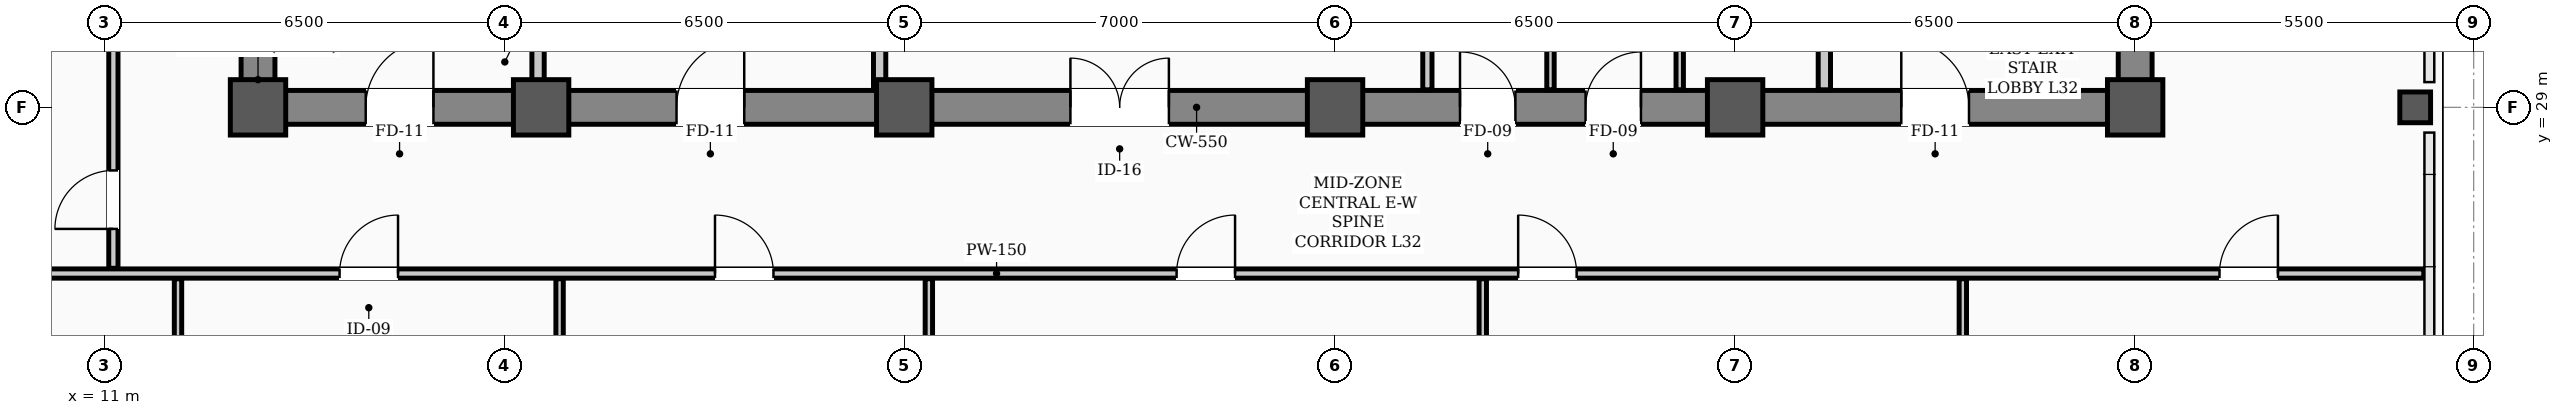
"""IFC4 building model, lengths in metres.
Left out: names, types, materials, properties, quantities, classifications, styles, units other than length and angle.
Written with IfcOpenShell. Run it as: python <this file> out.ifc"""

import sys

from ifc_helpers import new_model, si_unit, direction, frame, frame_2d, origin, origin_2d, place, context, subcontext, project, spatial, rectangle, hollow_rectangle, extrude, element, fill, save


model = new_model("IFC4")
c1 = context("Model", 3, precision=1e-05, world=origin(), true_north=direction((0.0, 1.0)))
c2 = subcontext(c1, "Body", "Model", "MODEL_VIEW")
j1 = project(units=[si_unit("LENGTHUNIT", "METRE"), si_unit("PLANEANGLEUNIT", "RADIAN")], contexts=[c1])
p1 = place(None, origin())
s1 = spatial("IfcSite", under=j1, at=p1, CompositionType="ELEMENT")
p2 = place(p1, origin())
s2 = spatial("IfcBuilding", under=s1, at=p2, CompositionType="ELEMENT")
p3 = place(p2, frame((0.0, 0.0, 130.5)))
s3 = spatial("IfcBuildingStorey", under=s2, at=p3, CompositionType="ELEMENT", Elevation=130.5)
for number, where, z_axis, x_axis in (
    (1, (13.5, 29.0, 0.0), (0.0, 0.0, 1.0), (1.0, 0.0, 0.0)),
    (2, (18.1, 29.0, 0.0), (0.0, 0.0, 1.0), (1.0, 0.0, 0.0)),
    (3, (24.0, 29.0, 0.0), (0.0, 0.0, 1.0), (1.0, 0.0, 0.0)),
    (4, (31.0, 29.0, 0.0), (0.0, 0.0, 1.0), (1.0, 0.0, 0.0)),
    (5, (37.5, 29.0, 0.0), (0.0, 0.0, 1.0), (1.0, 0.0, 0.0)),
    (6, (44.0, 29.0, 0.0), (0.0, 0.0, 1.0), (1.0, 0.0, 0.0)),
):
    element("IfcColumn", number, at=place(p3, frame(where, z_axis=z_axis, x_axis=x_axis)), inside=s3, PredefinedType="COLUMN", context=c2, shape_type="SweptSolid", body=[
        extrude(hollow_rectangle(XDim=0.9, YDim=0.9, WallThickness=0.035, InnerFilletRadius=0.017, OuterFilletRadius=0.052, at=origin_2d()), origin(), (0.0, 0.0, 1.0), 3.9),
    ])
p4 = place(p3, frame((48.55, 29.0, 0.0), z_axis=(0.0, 0.0, 1.0), x_axis=(1.0, 0.0, 0.0)))
e7 = element("IfcColumn", 7, at=p4, inside=s3, PredefinedType="COLUMN", context=c2, shape_type="SweptSolid", body=[
    extrude(hollow_rectangle(XDim=0.5, YDim=0.5, WallThickness=0.024, InnerFilletRadius=0.012, OuterFilletRadius=0.036, at=origin_2d()), origin(), (0.0, 0.0, 1.0), 3.9),
])
p5 = place(p3, frame((13.5, 29.0, 0.0), z_axis=(0.0, 0.0, 1.0), x_axis=(1.0, 0.0, 0.0)))
e8 = element("IfcWall", 8, at=p5, inside=s3, PredefinedType="SHEAR", context=c2, shape_type="SweptSolid", body=[
    extrude(rectangle(XDim=30.5, YDim=0.55, at=frame_2d((15.25, 0.0))), origin(), (0.0, 0.0, 1.0), 3.72),
])
p6 = place(p5, frame((1.75, 0.0, 0.0)))
e9 = element("IfcOpeningElement", 9, at=p6, cuts=e8, PredefinedType="OPENING", context=c2, shape_type="SweptSolid", body=[
    extrude(rectangle(XDim=1.1, YDim=2.08, at=frame_2d((0.55, 1.04))), frame((0.0, 0.285, 0.0), z_axis=(0.0, -1.0, 0.0), x_axis=(1.0, 0.0, 0.0)), (0.0, 0.0, 1.0), 0.57),
])
p7 = place(p5, frame((26.7, 0.0, 0.0)))
e10 = element("IfcOpeningElement", 10, at=p7, cuts=e8, PredefinedType="OPENING", context=c2, shape_type="SweptSolid", body=[
    extrude(rectangle(XDim=1.1, YDim=2.08, at=frame_2d((0.55, 1.04))), frame((0.0, 0.285, 0.0), z_axis=(0.0, -1.0, 0.0), x_axis=(1.0, 0.0, 0.0)), (0.0, 0.0, 1.0), 0.57),
])
p8 = place(p5, frame((6.8, 0.0, 0.0)))
e11 = element("IfcOpeningElement", 11, at=p8, cuts=e8, PredefinedType="OPENING", context=c2, shape_type="SweptSolid", body=[
    extrude(rectangle(XDim=1.1, YDim=2.08, at=frame_2d((0.55, 1.04))), frame((0.0, 0.285, 0.0), z_axis=(0.0, -1.0, 0.0), x_axis=(1.0, 0.0, 0.0)), (0.0, 0.0, 1.0), 0.57),
])
p9 = place(p5, frame((13.2, 0.0, 0.0)))
e12 = element("IfcOpeningElement", 12, at=p9, cuts=e8, PredefinedType="OPENING", context=c2, shape_type="SweptSolid", body=[
    extrude(rectangle(XDim=1.6, YDim=2.08, at=frame_2d((0.8, 1.04))), frame((0.0, 0.285, 0.0), z_axis=(0.0, -1.0, 0.0), x_axis=(1.0, 0.0, 0.0)), (0.0, 0.0, 1.0), 0.57),
])
p10 = place(p5, frame((19.53, 0.0, 0.0)))
e13 = element("IfcOpeningElement", 13, at=p10, cuts=e8, PredefinedType="OPENING", context=c2, shape_type="SweptSolid", body=[
    extrude(rectangle(XDim=0.9, YDim=2.08, at=frame_2d((0.45, 1.04))), frame((0.0, 0.285, 0.0), z_axis=(0.0, -1.0, 0.0), x_axis=(1.0, 0.0, 0.0)), (0.0, 0.0, 1.0), 0.57),
])
p11 = place(p5, frame((21.57, 0.0, 0.0)))
e14 = element("IfcOpeningElement", 14, at=p11, cuts=e8, PredefinedType="OPENING", context=c2, shape_type="SweptSolid", body=[
    extrude(rectangle(XDim=0.9, YDim=2.08, at=frame_2d((0.45, 1.04))), frame((0.0, 0.285, 0.0), z_axis=(0.0, -1.0, 0.0), x_axis=(1.0, 0.0, 0.0)), (0.0, 0.0, 1.0), 0.57),
])
for number, where, z_axis, x_axis in (
    (15, (13.5, 29.35, 0.0), (0.0, 0.0, 1.0), (0.0, 1.0, 0.0)),
    (16, (44.0, 29.35, 0.0), (0.0, 0.0, 1.0), (0.0, 1.0, 0.0)),
):
    element("IfcWall", number, at=place(p3, frame(where, z_axis=z_axis, x_axis=x_axis)), inside=s3, PredefinedType="SHEAR", context=c2, shape_type="SweptSolid", body=[
        extrude(rectangle(XDim=8.6, YDim=0.55, at=frame_2d((4.3, 0.0))), origin(), (0.0, 0.0, 1.0), 3.72),
    ])
p12 = place(p3, frame((2.31, 26.3, 0.0), z_axis=(0.0, 0.0, 1.0), x_axis=(1.0, 0.0, 0.0)))
e17 = element("IfcWall", 17, at=p12, inside=s3, PredefinedType="PARTITIONING", context=c2, shape_type="SweptSolid", body=[
    extrude(rectangle(XDim=46.38, YDim=0.15, at=frame_2d((23.19, 0.0))), origin(), (0.0, 0.0, 1.0), 3.1),
])
p13 = place(p12, frame((12.515, 0.0, 0.0)))
e18 = element("IfcOpeningElement", 18, at=p13, cuts=e17, PredefinedType="OPENING", context=c2, shape_type="SweptSolid", body=[
    extrude(rectangle(XDim=0.95, YDim=2.08, at=frame_2d((0.475, 1.04))), frame((0.0, 0.085, 0.0), z_axis=(0.0, -1.0, 0.0), x_axis=(1.0, 0.0, 0.0)), (0.0, 0.0, 1.0), 0.17),
])
p14 = place(p12, frame((18.615, 0.0, 0.0)))
e19 = element("IfcOpeningElement", 19, at=p14, cuts=e17, PredefinedType="OPENING", context=c2, shape_type="SweptSolid", body=[
    extrude(rectangle(XDim=0.95, YDim=2.08, at=frame_2d((0.475, 1.04))), frame((0.0, 0.085, 0.0), z_axis=(0.0, -1.0, 0.0), x_axis=(1.0, 0.0, 0.0)), (0.0, 0.0, 1.0), 0.17),
])
p15 = place(p12, frame((26.115, 0.0, 0.0)))
e20 = element("IfcOpeningElement", 20, at=p15, cuts=e17, PredefinedType="OPENING", context=c2, shape_type="SweptSolid", body=[
    extrude(rectangle(XDim=0.95, YDim=2.08, at=frame_2d((0.475, 1.04))), frame((0.0, 0.085, 0.0), z_axis=(0.0, -1.0, 0.0), x_axis=(1.0, 0.0, 0.0)), (0.0, 0.0, 1.0), 0.17),
])
p16 = place(p12, frame((31.665, 0.0, 0.0)))
e21 = element("IfcOpeningElement", 21, at=p16, cuts=e17, PredefinedType="OPENING", context=c2, shape_type="SweptSolid", body=[
    extrude(rectangle(XDim=0.95, YDim=2.08, at=frame_2d((0.475, 1.04))), frame((0.0, 0.085, 0.0), z_axis=(0.0, -1.0, 0.0), x_axis=(1.0, 0.0, 0.0)), (0.0, 0.0, 1.0), 0.17),
])
p17 = place(p12, frame((43.06, 0.0, 0.0)))
e22 = element("IfcOpeningElement", 22, at=p17, cuts=e17, PredefinedType="OPENING", context=c2, shape_type="SweptSolid", body=[
    extrude(rectangle(XDim=0.95, YDim=2.08, at=frame_2d((0.475, 1.04))), frame((0.0, 0.085, 0.0), z_axis=(0.0, -1.0, 0.0), x_axis=(1.0, 0.0, 0.0)), (0.0, 0.0, 1.0), 0.17),
])
for number, where, z_axis, x_axis in (
    (23, (18.05, 29.285, 0.0), (0.0, 0.0, 1.0), (0.0, 1.0, 0.0)),
    (24, (38.95, 29.285, 0.0), (0.0, 0.0, 1.0), (0.0, 1.0, 0.0)),
):
    element("IfcWall", number, at=place(p3, frame(where, z_axis=z_axis, x_axis=x_axis)), inside=s3, PredefinedType="STANDARD", context=c2, shape_type="SweptSolid", body=[
        extrude(rectangle(XDim=1.015, YDim=0.2, at=frame_2d((0.508, 0.0))), origin(), (0.0, 0.0, 1.0), 3.3),
    ])
p18 = place(p3, frame((23.6, 29.285, 0.0), z_axis=(0.0, 0.0, 1.0), x_axis=(0.0, 1.0, 0.0)))
e25 = element("IfcWall", 25, at=p18, inside=s3, PredefinedType="STANDARD", context=c2, shape_type="SweptSolid", body=[
    extrude(rectangle(XDim=5.415, YDim=0.2, at=frame_2d((2.708, 0.0))), origin(), (0.0, 0.0, 1.0), 3.1),
])
p19 = place(p3, frame((32.5, 29.285, 0.0), z_axis=(0.0, 0.0, 1.0), x_axis=(0.0, 1.0, 0.0)))
e26 = element("IfcWall", 26, at=p19, inside=s3, PredefinedType="PARTITIONING", context=c2, shape_type="SweptSolid", body=[
    extrude(rectangle(XDim=2.48, YDim=0.15, at=frame_2d((1.24, 0.0))), origin(), (0.0, 0.0, 1.0), 3.3),
])
for number, where, z_axis, x_axis in (
    (27, (36.6, 29.285, 0.0), (0.0, 0.0, 1.0), (0.0, 1.0, 0.0)),
    (28, (34.5, 29.285, 0.0), (0.0, 0.0, 1.0), (0.0, 1.0, 0.0)),
):
    element("IfcWall", number, at=place(p3, frame(where, z_axis=z_axis, x_axis=x_axis)), inside=s3, PredefinedType="PARTITIONING", context=c2, shape_type="SweptSolid", body=[
        extrude(rectangle(XDim=2.48, YDim=0.12, at=frame_2d((1.24, 0.0))), origin(), (0.0, 0.0, 1.0), 3.3),
    ])
p20 = place(p3, frame((11.15, 26.385, 0.0), z_axis=(0.0, 0.0, 1.0), x_axis=(0.0, 1.0, 0.0)))
e29 = element("IfcWall", 29, at=p20, inside=s3, PredefinedType="PARTITIONING", context=c2, shape_type="SweptSolid", body=[
    extrude(rectangle(XDim=11.28, YDim=0.15, at=frame_2d((5.64, 0.0))), origin(), (0.0, 0.0, 1.0), 3.0),
])
p21 = place(p20, frame((0.64, 0.0, 0.0)))
e30 = element("IfcOpeningElement", 30, at=p21, cuts=e29, PredefinedType="OPENING", context=c2, shape_type="SweptSolid", body=[
    extrude(rectangle(XDim=0.95, YDim=2.08, at=frame_2d((0.475, 1.04))), frame((0.0, 0.085, 0.0), z_axis=(0.0, -1.0, 0.0), x_axis=(1.0, 0.0, 0.0)), (0.0, 0.0, 1.0), 0.17),
])
p22 = place(p20, frame((8.765, 0.0, 0.0)))
e31 = element("IfcOpeningElement", 31, at=p22, cuts=e29, PredefinedType="OPENING", context=c2, shape_type="SweptSolid", body=[
    extrude(rectangle(XDim=0.95, YDim=2.08, at=frame_2d((0.475, 1.04))), frame((0.0, 0.085, 0.0), z_axis=(0.0, -1.0, 0.0), x_axis=(1.0, 0.0, 0.0)), (0.0, 0.0, 1.0), 0.17),
])
p23 = place(p3, frame((12.2, 10.81, 0.0), z_axis=(0.0, 0.0, 1.0), x_axis=(0.0, 1.0, 0.0)))
e32 = element("IfcWall", 32, at=p23, inside=s3, PredefinedType="PARTITIONING", context=c2, shape_type="SweptSolid", body=[
    extrude(rectangle(XDim=15.405, YDim=0.12, at=frame_2d((7.703, 0.0))), origin(), (0.0, 0.0, 1.0), 3.0),
])
p24 = place(p23, frame((13.415, 0.0, 0.0)))
e33 = element("IfcOpeningElement", 33, at=p24, cuts=e32, PredefinedType="OPENING", context=c2, shape_type="SweptSolid", body=[
    extrude(rectangle(XDim=0.95, YDim=2.08, at=frame_2d((0.475, 1.04))), frame((0.0, 0.07, 0.0), z_axis=(0.0, -1.0, 0.0), x_axis=(1.0, 0.0, 0.0)), (0.0, 0.0, 1.0), 0.14),
])
p25 = place(p3, frame((18.4, 10.81, 0.0), z_axis=(0.0, 0.0, 1.0), x_axis=(0.0, 1.0, 0.0)))
e34 = element("IfcWall", 34, at=p25, inside=s3, PredefinedType="PARTITIONING", context=c2, shape_type="SweptSolid", body=[
    extrude(rectangle(XDim=15.405, YDim=0.12, at=frame_2d((7.703, 0.0))), origin(), (0.0, 0.0, 1.0), 3.0),
])
p26 = place(p3, frame((24.4, 12.57, 0.0), z_axis=(0.0, 0.0, 1.0), x_axis=(0.0, 1.0, 0.0)))
e35 = element("IfcWall", 35, at=p26, inside=s3, PredefinedType="PARTITIONING", context=c2, shape_type="SweptSolid", body=[
    extrude(rectangle(XDim=13.645, YDim=0.12, at=frame_2d((6.823, 0.0))), origin(), (0.0, 0.0, 1.0), 3.0),
])
for number, where, z_axis, x_axis in (
    (36, (33.4, 10.81, 0.0), (0.0, 0.0, 1.0), (0.0, 1.0, 0.0)),
    (37, (41.2, 10.81, 0.0), (0.0, 0.0, 1.0), (0.0, 1.0, 0.0)),
):
    element("IfcWall", number, at=place(p3, frame(where, z_axis=z_axis, x_axis=x_axis)), inside=s3, PredefinedType="PARTITIONING", context=c2, shape_type="SweptSolid", body=[
        extrude(rectangle(XDim=15.405, YDim=0.12, at=frame_2d((7.703, 0.0))), origin(), (0.0, 0.0, 1.0), 3.0),
    ])
p27 = place(p6, origin())
e38 = element("IfcDoor", 38, at=p27, inside=s3, OperationType="SINGLE_SWING_RIGHT", PredefinedType="DOOR", context=c2, shape_type="SweptSolid", body=[
    extrude(rectangle(XDim=1.1, YDim=2.08, at=frame_2d((0.55, 1.04))), frame((0.0, 0.025, 0.0), z_axis=(0.0, -1.0, 0.0), x_axis=(1.0, 0.0, 0.0)), (0.0, 0.0, 1.0), 0.05),
])
fill(e9, e38)
p28 = place(p7, origin())
e39 = element("IfcDoor", 39, at=p28, inside=s3, OperationType="SINGLE_SWING_LEFT", PredefinedType="DOOR", context=c2, shape_type="SweptSolid", body=[
    extrude(rectangle(XDim=1.1, YDim=2.08, at=frame_2d((0.55, 1.04))), frame((0.0, 0.025, 0.0), z_axis=(0.0, -1.0, 0.0), x_axis=(1.0, 0.0, 0.0)), (0.0, 0.0, 1.0), 0.05),
])
fill(e10, e39)
p29 = place(p8, origin())
e40 = element("IfcDoor", 40, at=p29, inside=s3, OperationType="SINGLE_SWING_RIGHT", PredefinedType="DOOR", context=c2, shape_type="SweptSolid", body=[
    extrude(rectangle(XDim=1.1, YDim=2.08, at=frame_2d((0.55, 1.04))), frame((0.0, 0.025, 0.0), z_axis=(0.0, -1.0, 0.0), x_axis=(1.0, 0.0, 0.0)), (0.0, 0.0, 1.0), 0.05),
])
fill(e11, e40)
p30 = place(p9, origin())
e41 = element("IfcDoor", 41, at=p30, inside=s3, OperationType="DOUBLE_DOOR_SINGLE_SWING", PredefinedType="DOOR", context=c2, shape_type="SweptSolid", body=[
    extrude(rectangle(XDim=1.6, YDim=2.08, at=frame_2d((0.8, 1.04))), frame((0.0, 0.025, 0.0), z_axis=(0.0, -1.0, 0.0), x_axis=(1.0, 0.0, 0.0)), (0.0, 0.0, 1.0), 0.05),
])
fill(e12, e41)
p31 = place(p10, origin())
e42 = element("IfcDoor", 42, at=p31, inside=s3, OperationType="SINGLE_SWING_LEFT", PredefinedType="DOOR", context=c2, shape_type="SweptSolid", body=[
    extrude(rectangle(XDim=0.9, YDim=2.08, at=frame_2d((0.45, 1.04))), frame((0.0, 0.025, 0.0), z_axis=(0.0, -1.0, 0.0), x_axis=(1.0, 0.0, 0.0)), (0.0, 0.0, 1.0), 0.05),
])
fill(e13, e42)
p32 = place(p11, origin())
e43 = element("IfcDoor", 43, at=p32, inside=s3, OperationType="SINGLE_SWING_RIGHT", PredefinedType="DOOR", context=c2, shape_type="SweptSolid", body=[
    extrude(rectangle(XDim=0.9, YDim=2.08, at=frame_2d((0.45, 1.04))), frame((0.0, 0.025, 0.0), z_axis=(0.0, -1.0, 0.0), x_axis=(1.0, 0.0, 0.0)), (0.0, 0.0, 1.0), 0.05),
])
fill(e14, e43)
p33 = place(p13, origin())
e44 = element("IfcDoor", 44, at=p33, inside=s3, OperationType="SINGLE_SWING_RIGHT", PredefinedType="DOOR", context=c2, shape_type="SweptSolid", body=[
    extrude(rectangle(XDim=0.95, YDim=2.08, at=frame_2d((0.475, 1.04))), frame((0.0, 0.025, 0.0), z_axis=(0.0, -1.0, 0.0), x_axis=(1.0, 0.0, 0.0)), (0.0, 0.0, 1.0), 0.05),
])
fill(e18, e44)
p34 = place(p14, origin())
e45 = element("IfcDoor", 45, at=p34, inside=s3, OperationType="SINGLE_SWING_LEFT", PredefinedType="DOOR", context=c2, shape_type="SweptSolid", body=[
    extrude(rectangle(XDim=0.95, YDim=2.08, at=frame_2d((0.475, 1.04))), frame((0.0, 0.025, 0.0), z_axis=(0.0, -1.0, 0.0), x_axis=(1.0, 0.0, 0.0)), (0.0, 0.0, 1.0), 0.05),
])
fill(e19, e45)
p35 = place(p15, origin())
e46 = element("IfcDoor", 46, at=p35, inside=s3, OperationType="SINGLE_SWING_RIGHT", PredefinedType="DOOR", context=c2, shape_type="SweptSolid", body=[
    extrude(rectangle(XDim=0.95, YDim=2.08, at=frame_2d((0.475, 1.04))), frame((0.0, 0.025, 0.0), z_axis=(0.0, -1.0, 0.0), x_axis=(1.0, 0.0, 0.0)), (0.0, 0.0, 1.0), 0.05),
])
fill(e20, e46)
p36 = place(p16, origin())
e47 = element("IfcDoor", 47, at=p36, inside=s3, OperationType="SINGLE_SWING_LEFT", PredefinedType="DOOR", context=c2, shape_type="SweptSolid", body=[
    extrude(rectangle(XDim=0.95, YDim=2.08, at=frame_2d((0.475, 1.04))), frame((0.0, 0.025, 0.0), z_axis=(0.0, -1.0, 0.0), x_axis=(1.0, 0.0, 0.0)), (0.0, 0.0, 1.0), 0.05),
])
fill(e21, e47)
p37 = place(p17, origin())
e48 = element("IfcDoor", 48, at=p37, inside=s3, OperationType="SINGLE_SWING_RIGHT", PredefinedType="DOOR", context=c2, shape_type="SweptSolid", body=[
    extrude(rectangle(XDim=0.95, YDim=2.08, at=frame_2d((0.475, 1.04))), frame((0.0, 0.025, 0.0), z_axis=(0.0, -1.0, 0.0), x_axis=(1.0, 0.0, 0.0)), (0.0, 0.0, 1.0), 0.05),
])
fill(e22, e48)
p38 = place(p21, origin())
e49 = element("IfcDoor", 49, at=p38, inside=s3, OperationType="SINGLE_SWING_LEFT", PredefinedType="DOOR", context=c2, shape_type="SweptSolid", body=[
    extrude(rectangle(XDim=0.95, YDim=2.08, at=frame_2d((0.475, 1.04))), frame((0.0, 0.025, 0.0), z_axis=(0.0, -1.0, 0.0), x_axis=(1.0, 0.0, 0.0)), (0.0, 0.0, 1.0), 0.05),
])
fill(e30, e49)
save(model, sys.argv[1])
